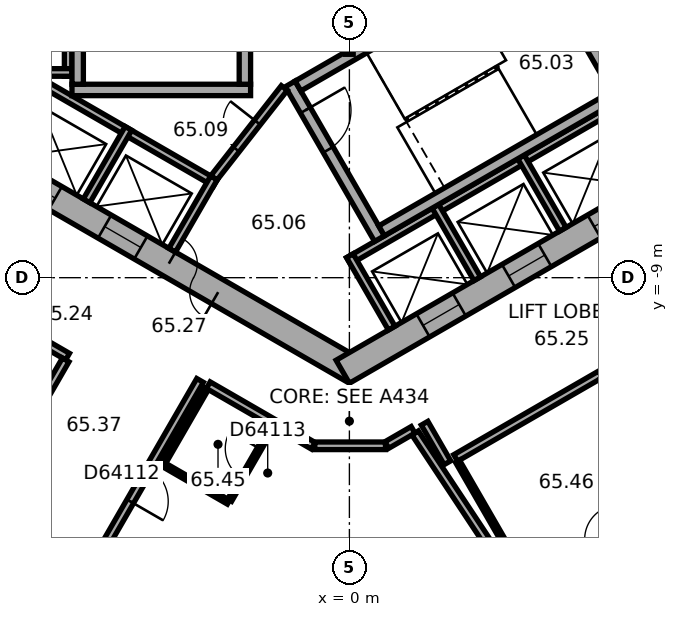
"""IFC4 building model, lengths in metres.
Left out: names, types, materials, properties, quantities, classifications, styles, units other than length and angle.
Written with IfcOpenShell. Run it as: python <this file> out.ifc"""

import sys

from ifc_helpers import new_model, si_unit, direction, frame, frame_2d, origin, place, context, subcontext, project, spatial, rectangle, extrude, element, fill, save


model = new_model("IFC4")
c1 = context("Model", 3, precision=1e-05, world=origin(), true_north=direction((0.0, 1.0)))
c2 = subcontext(c1, "Body", "Model", "MODEL_VIEW")
j1 = project(units=[si_unit("LENGTHUNIT", "METRE"), si_unit("PLANEANGLEUNIT", "RADIAN")], contexts=[c1])
p1 = place(None, origin())
s1 = spatial("IfcSite", under=j1, at=p1, CompositionType="ELEMENT")
p2 = place(p1, origin())
s2 = spatial("IfcBuilding", under=s1, at=p2, CompositionType="ELEMENT")
p3 = place(p2, frame((0.0, 0.0, 263.5)))
s3 = spatial("IfcBuildingStorey", under=s2, at=p3, CompositionType="ELEMENT", Elevation=263.5)
p4 = place(p3, frame((-10.025, -5.586, 0.0), z_axis=(0.0, 0.0, 1.0), x_axis=(0.866026453023, -0.499998182661, 0.0)))
e1 = element("IfcWall", 1, at=p4, inside=s3, PredefinedType="SHEAR", context=c2, shape_type="SweptSolid", body=[
    extrude(rectangle(XDim=11.778, YDim=0.7, at=frame_2d((5.889, 0.0))), origin(), (0.0, 0.0, 1.0), 3.7),
])
p5 = place(p4, frame((6.089, 0.0, 0.0)))
e2 = element("IfcOpeningElement", 2, at=p5, cuts=e1, PredefinedType="OPENING", context=c2, shape_type="SweptSolid", body=[
    extrude(rectangle(XDim=1.5, YDim=2.1, at=frame_2d((0.75, 1.05))), frame((0.0, 0.36, 0.0), z_axis=(0.0, -1.0, 0.0), x_axis=(1.0, 0.0, 0.0)), (0.0, 0.0, 1.0), 0.72),
])
p6 = place(p4, frame((1.539, 0.0, 0.0)))
e3 = element("IfcOpeningElement", 3, at=p6, cuts=e1, PredefinedType="OPENING", context=c2, shape_type="SweptSolid", body=[
    extrude(rectangle(XDim=1.1, YDim=2.1, at=frame_2d((0.55, 1.05))), frame((0.0, 0.36, 0.0), z_axis=(0.0, -1.0, 0.0), x_axis=(1.0, 0.0, 0.0)), (0.0, 0.0, 1.0), 0.72),
])
p7 = place(p4, frame((4.139, 0.0, 0.0)))
e4 = element("IfcOpeningElement", 4, at=p7, cuts=e1, PredefinedType="OPENING", context=c2, shape_type="SweptSolid", body=[
    extrude(rectangle(XDim=1.1, YDim=2.1, at=frame_2d((0.55, 1.05))), frame((0.0, 0.36, 0.0), z_axis=(0.0, -1.0, 0.0), x_axis=(1.0, 0.0, 0.0)), (0.0, 0.0, 1.0), 0.72),
])
p8 = place(p3, frame((-0.175, -11.475, 0.0), z_axis=(0.0, 0.0, 1.0), x_axis=(0.866026453023, 0.499998182661, 0.0)))
e5 = element("IfcWall", 5, at=p8, inside=s3, PredefinedType="SHEAR", context=c2, shape_type="SweptSolid", body=[
    extrude(rectangle(XDim=11.778, YDim=0.7, at=frame_2d((5.889, 0.0))), origin(), (0.0, 0.0, 1.0), 3.7),
])
p9 = place(p8, frame((2.439, 0.0, 0.0)))
e6 = element("IfcOpeningElement", 6, at=p9, cuts=e5, PredefinedType="OPENING", context=c2, shape_type="SweptSolid", body=[
    extrude(rectangle(XDim=1.1, YDim=2.1, at=frame_2d((0.55, 1.05))), frame((0.0, 0.36, 0.0), z_axis=(0.0, -1.0, 0.0), x_axis=(1.0, 0.0, 0.0)), (0.0, 0.0, 1.0), 0.72),
])
p10 = place(p8, frame((5.039, 0.0, 0.0)))
e7 = element("IfcOpeningElement", 7, at=p10, cuts=e5, PredefinedType="OPENING", context=c2, shape_type="SweptSolid", body=[
    extrude(rectangle(XDim=1.1, YDim=2.1, at=frame_2d((0.55, 1.05))), frame((0.0, 0.36, 0.0), z_axis=(0.0, -1.0, 0.0), x_axis=(1.0, 0.0, 0.0)), (0.0, 0.0, 1.0), 0.72),
])
p11 = place(p8, frame((7.639, 0.0, 0.0)))
e8 = element("IfcOpeningElement", 8, at=p11, cuts=e5, PredefinedType="OPENING", context=c2, shape_type="SweptSolid", body=[
    extrude(rectangle(XDim=1.1, YDim=2.1, at=frame_2d((0.55, 1.05))), frame((0.0, 0.36, 0.0), z_axis=(0.0, -1.0, 0.0), x_axis=(1.0, 0.0, 0.0)), (0.0, 0.0, 1.0), 0.72),
])
p12 = place(p3, frame((-16.626, -12.629, 0.0), z_axis=(0.0, 0.0, 1.0), x_axis=(0.866026460444, -0.499998169808, 0.0)))
e9 = element("IfcWall", 9, at=p12, inside=s3, PredefinedType="STANDARD", context=c2, shape_type="SweptSolid", body=[
    extrude(rectangle(XDim=17.731, YDim=0.2, at=frame_2d((8.866, 0.0))), origin(), (0.0, 0.0, 1.0), 3.7),
])
p13 = place(p12, frame((1.203, 0.0, 0.9)))
e10 = element("IfcOpeningElement", 10, at=p13, cuts=e9, PredefinedType="OPENING", context=c2, shape_type="SweptSolid", body=[
    extrude(rectangle(XDim=2.0, YDim=2.0, at=frame_2d((1.0, 1.0))), frame((0.0, 0.11, 0.0), z_axis=(0.0, -1.0, 0.0), x_axis=(1.0, 0.0, 0.0)), (0.0, 0.0, 1.0), 0.22),
])
p14 = place(p12, frame((4.535, 0.0, 0.9)))
e11 = element("IfcOpeningElement", 11, at=p14, cuts=e9, PredefinedType="OPENING", context=c2, shape_type="SweptSolid", body=[
    extrude(rectangle(XDim=2.0, YDim=2.0, at=frame_2d((1.0, 1.0))), frame((0.0, 0.11, 0.0), z_axis=(0.0, -1.0, 0.0), x_axis=(1.0, 0.0, 0.0)), (0.0, 0.0, 1.0), 0.22),
])
p15 = place(p12, frame((7.867, 0.0, 0.9)))
e12 = element("IfcOpeningElement", 12, at=p15, cuts=e9, PredefinedType="OPENING", context=c2, shape_type="SweptSolid", body=[
    extrude(rectangle(XDim=2.0, YDim=2.0, at=frame_2d((1.0, 1.0))), frame((0.0, 0.11, 0.0), z_axis=(0.0, -1.0, 0.0), x_axis=(1.0, 0.0, 0.0)), (0.0, 0.0, 1.0), 0.22),
])
p16 = place(p12, frame((11.198, 0.0, 0.9)))
e13 = element("IfcOpeningElement", 13, at=p16, cuts=e9, PredefinedType="OPENING", context=c2, shape_type="SweptSolid", body=[
    extrude(rectangle(XDim=2.0, YDim=2.0, at=frame_2d((1.0, 1.0))), frame((0.0, 0.11, 0.0), z_axis=(0.0, -1.0, 0.0), x_axis=(1.0, 0.0, 0.0)), (0.0, 0.0, 1.0), 0.22),
])
p17 = place(p12, frame((14.53, 0.0, 0.9)))
e14 = element("IfcOpeningElement", 14, at=p17, cuts=e9, PredefinedType="OPENING", context=c2, shape_type="SweptSolid", body=[
    extrude(rectangle(XDim=2.0, YDim=2.0, at=frame_2d((1.0, 1.0))), frame((0.0, 0.11, 0.0), z_axis=(0.0, -1.0, 0.0), x_axis=(1.0, 0.0, 0.0)), (0.0, 0.0, 1.0), 0.22),
])
p18 = place(p3, frame((2.58, -21.377, 0.0), z_axis=(0.0, 0.0, 1.0), x_axis=(0.833888592176, 0.551932800112, 0.0)))
e15 = element("IfcWall", 15, at=p18, inside=s3, PredefinedType="STANDARD", context=c2, shape_type="SweptSolid", body=[
    extrude(rectangle(XDim=17.731, YDim=0.2, at=frame_2d((8.866, 0.0))), origin(), (0.0, 0.0, 1.0), 3.7),
])
p19 = place(p18, frame((1.202, 0.0, 0.9)))
e16 = element("IfcOpeningElement", 16, at=p19, cuts=e15, PredefinedType="OPENING", context=c2, shape_type="SweptSolid", body=[
    extrude(rectangle(XDim=2.0, YDim=2.0, at=frame_2d((1.0, 1.0))), frame((0.0, 0.11, 0.0), z_axis=(0.0, -1.0, 0.0), x_axis=(1.0, 0.0, 0.0)), (0.0, 0.0, 1.0), 0.22),
])
p20 = place(p18, frame((4.533, 0.0, 0.9)))
e17 = element("IfcOpeningElement", 17, at=p20, cuts=e15, PredefinedType="OPENING", context=c2, shape_type="SweptSolid", body=[
    extrude(rectangle(XDim=2.0, YDim=2.0, at=frame_2d((1.0, 1.0))), frame((0.0, 0.11, 0.0), z_axis=(0.0, -1.0, 0.0), x_axis=(1.0, 0.0, 0.0)), (0.0, 0.0, 1.0), 0.22),
])
p21 = place(p18, frame((7.865, 0.0, 0.9)))
e18 = element("IfcOpeningElement", 18, at=p21, cuts=e15, PredefinedType="OPENING", context=c2, shape_type="SweptSolid", body=[
    extrude(rectangle(XDim=2.0, YDim=2.0, at=frame_2d((1.0, 1.0))), frame((0.0, 0.11, 0.0), z_axis=(0.0, -1.0, 0.0), x_axis=(1.0, 0.0, 0.0)), (0.0, 0.0, 1.0), 0.22),
])
p22 = place(p18, frame((11.197, 0.0, 0.9)))
e19 = element("IfcOpeningElement", 19, at=p22, cuts=e15, PredefinedType="OPENING", context=c2, shape_type="SweptSolid", body=[
    extrude(rectangle(XDim=2.0, YDim=2.0, at=frame_2d((1.0, 1.0))), frame((0.0, 0.11, 0.0), z_axis=(0.0, -1.0, 0.0), x_axis=(1.0, 0.0, 0.0)), (0.0, 0.0, 1.0), 0.22),
])
p23 = place(p18, frame((14.528, 0.0, 0.9)))
e20 = element("IfcOpeningElement", 20, at=p23, cuts=e15, PredefinedType="OPENING", context=c2, shape_type="SweptSolid", body=[
    extrude(rectangle(XDim=2.0, YDim=2.0, at=frame_2d((1.0, 1.0))), frame((0.0, 0.11, 0.0), z_axis=(0.0, -1.0, 0.0), x_axis=(1.0, 0.0, 0.0)), (0.0, 0.0, 1.0), 0.22),
])
p24 = place(p3, frame((-7.4, 4.3, 0.0), z_axis=(0.0, 0.0, 1.0), x_axis=(0.0, -1.0, 0.0)))
e21 = element("IfcWall", 21, at=p24, inside=s3, PredefinedType="PARTITIONING", context=c2, shape_type="SweptSolid", body=[
    extrude(rectangle(XDim=8.0, YDim=0.2, at=frame_2d((4.0, 0.0))), origin(), (0.0, 0.0, 1.0), 3.42),
])
p25 = place(p3, frame((-7.3, -3.6, 0.0), z_axis=(0.0, 0.0, 1.0), x_axis=(-1.0, 0.0, 0.0)))
e22 = element("IfcWall", 22, at=p25, inside=s3, PredefinedType="PARTITIONING", context=c2, shape_type="SweptSolid", body=[
    extrude(rectangle(XDim=2.2, YDim=0.2, at=frame_2d((1.1, 0.0))), origin(), (0.0, 0.0, 1.0), 3.42),
])
p26 = place(p3, frame((-8.203, -3.809, 0.0), z_axis=(0.0, 0.0, 1.0), x_axis=(0.866028230842, -0.499995103361, 0.0)))
e23 = element("IfcWall", 23, at=p26, inside=s3, PredefinedType="PARTITIONING", context=c2, shape_type="SweptSolid", body=[
    extrude(rectangle(XDim=5.4, YDim=0.2, at=frame_2d((2.7, 0.0))), origin(), (0.0, 0.0, 1.0), 3.42),
])
p27 = place(p3, frame((-5.815, -5.072, 0.0), z_axis=(0.0, 0.0, 1.0), x_axis=(-0.499946605688, -0.86605622881, 0.0)))
e24 = element("IfcWall", 24, at=p27, inside=s3, PredefinedType="PARTITIONING", context=c2, shape_type="SweptSolid", body=[
    extrude(rectangle(XDim=2.2, YDim=0.2, at=frame_2d((1.1, 0.0))), origin(), (0.0, 0.0, 1.0), 3.42),
])
p28 = place(p3, frame((-3.563, -6.372, 0.0), z_axis=(0.0, 0.0, 1.0), x_axis=(-0.499994660107, -0.866028486751, 0.0)))
e25 = element("IfcWall", 25, at=p28, inside=s3, PredefinedType="PARTITIONING", context=c2, shape_type="SweptSolid", body=[
    extrude(rectangle(XDim=2.2, YDim=0.2, at=frame_2d((1.1, 0.0))), origin(), (0.0, 0.0, 1.0), 3.42),
])
p29 = place(p3, frame((-0.024, -8.559, 0.0), z_axis=(0.0, 0.0, 1.0), x_axis=(0.866026010844, 0.49999894854, 0.0)))
e26 = element("IfcWall", 26, at=p29, inside=s3, PredefinedType="PARTITIONING", context=c2, shape_type="SweptSolid", body=[
    extrude(rectangle(XDim=8.0, YDim=0.2, at=frame_2d((4.0, 0.0))), origin(), (0.0, 0.0, 1.0), 3.42),
])
for number, where, z_axis, x_axis in (
    (27, (0.013, -8.422, 0.0), (0.0, 0.0, 1.0), (0.5, -0.866, 0.0)),
    (28, (2.264, -7.122, 0.0), (0.0, 0.0, 1.0), (0.5, -0.866, 0.0)),
    (29, (4.516, -5.822, 0.0), (0.0, 0.0, 1.0), (0.5, -0.866, 0.0)),
):
    element("IfcWall", number, at=place(p3, frame(where, z_axis=z_axis, x_axis=x_axis)), inside=s3, PredefinedType="PARTITIONING", context=c2, shape_type="SweptSolid", body=[
        extrude(rectangle(XDim=2.2, YDim=0.2, at=frame_2d((1.1, 0.0))), origin(), (0.0, 0.0, 1.0), 3.42),
    ])
p30 = place(p3, frame((-2.6, -4.06, 0.0), z_axis=(0.0, 0.0, 1.0), x_axis=(-1.0, 0.0, 0.0)))
e30 = element("IfcWall", 30, at=p30, inside=s3, PredefinedType="SHEAR", context=c2, shape_type="SweptSolid", body=[
    extrude(rectangle(XDim=4.7, YDim=0.3, at=frame_2d((2.35, 0.0))), origin(), (0.0, 0.0, 1.0), 3.42),
])
for number, where, z_axis, x_axis in (
    (31, (-2.75, 3.15, 0.0), (0.0, 0.0, 1.0), (0.0, -1.0, 0.0)),
    (32, (-7.15, 3.15, 0.0), (0.0, 0.0, 1.0), (0.0, -1.0, 0.0)),
):
    element("IfcWall", number, at=place(p3, frame(where, z_axis=z_axis, x_axis=x_axis)), inside=s3, PredefinedType="SHEAR", context=c2, shape_type="SweptSolid", body=[
        extrude(rectangle(XDim=7.06, YDim=0.3, at=frame_2d((3.53, 0.0))), origin(), (0.0, 0.0, 1.0), 3.42),
    ])
p31 = place(p3, frame((-1.558, -3.902, 0.0), z_axis=(0.0, 0.0, 1.0), x_axis=(0.499977259774, -0.866038532462, 0.0)))
e33 = element("IfcWall", 33, at=p31, inside=s3, PredefinedType="SHEAR", context=c2, shape_type="SweptSolid", body=[
    extrude(rectangle(XDim=4.7, YDim=0.3, at=frame_2d((2.35, 0.0))), origin(), (0.0, 0.0, 1.0), 3.42),
])
p32 = place(p31, frame((0.8, 0.0, 0.0)))
e34 = element("IfcOpeningElement", 34, at=p32, cuts=e33, PredefinedType="OPENING", context=c2, shape_type="SweptSolid", body=[
    extrude(rectangle(XDim=1.2, YDim=2.1, at=frame_2d((0.6, 1.05))), frame((0.0, 0.16, 0.0), z_axis=(0.0, -1.0, 0.0), x_axis=(1.0, 0.0, 0.0)), (0.0, 0.0, 1.0), 0.32),
])
p33 = place(p3, frame((4.816, -0.222, 0.0), z_axis=(0.0, 0.0, 1.0), x_axis=(0.499977259774, -0.866038532462, 0.0)))
e35 = element("IfcWall", 35, at=p33, inside=s3, PredefinedType="SHEAR", context=c2, shape_type="SweptSolid", body=[
    extrude(rectangle(XDim=4.7, YDim=0.3, at=frame_2d((2.35, 0.0))), origin(), (0.0, 0.0, 1.0), 3.42),
])
for number, where, z_axis, x_axis in (
    (36, (-1.353, -3.957, 0.0), (0.0, 0.0, 1.0), (0.866, 0.5, 0.0)),
    (37, (0.847, -7.767, 0.0), (0.0, 0.0, 1.0), (0.866, 0.5, 0.0)),
):
    element("IfcWall", number, at=place(p3, frame(where, z_axis=z_axis, x_axis=x_axis)), inside=s3, PredefinedType="SHEAR", context=c2, shape_type="SweptSolid", body=[
        extrude(rectangle(XDim=7.06, YDim=0.3, at=frame_2d((3.53, 0.0))), origin(), (0.0, 0.0, 1.0), 3.42),
    ])
p34 = place(p3, frame((-1.712, -4.008, 0.0), z_axis=(0.0, 0.0, 1.0), x_axis=(-0.616549420702, -0.787316208287, 0.0)))
e38 = element("IfcWall", 38, at=p34, inside=s3, PredefinedType="PARTITIONING", context=c2, shape_type="SweptSolid", body=[
    extrude(rectangle(XDim=3.002, YDim=0.2, at=frame_2d((1.501, 0.0))), origin(), (0.0, 0.0, 1.0), 3.42),
])
p35 = place(p34, frame((1.15, 0.0, 0.0)))
e39 = element("IfcOpeningElement", 39, at=p35, cuts=e38, PredefinedType="OPENING", context=c2, shape_type="SweptSolid", body=[
    extrude(rectangle(XDim=0.9, YDim=2.1, at=frame_2d((0.45, 1.05))), frame((0.0, 0.11, 0.0), z_axis=(0.0, -1.0, 0.0), x_axis=(1.0, 0.0, 0.0)), (0.0, 0.0, 1.0), 0.22),
])
p36 = place(p3, frame((0.0, -3.122, 0.0), z_axis=(0.0, 0.0, 1.0), x_axis=(0.0, 1.0, 0.0)))
e40 = element("IfcWall", 40, at=p36, inside=s3, PredefinedType="PARTITIONING", context=c2, shape_type="SweptSolid", body=[
    extrude(rectangle(XDim=6.245, YDim=0.2, at=frame_2d((3.122, 0.0))), origin(), (0.0, 0.0, 1.0), 3.42),
])
p37 = place(p3, frame((-11.501, -8.719, 0.0), z_axis=(0.0, 0.0, 1.0), x_axis=(0.866024434742, -0.500001678427, 0.0)))
e41 = element("IfcWall", 41, at=p37, inside=s3, PredefinedType="PARTITIONING", context=c2, shape_type="SweptSolid", body=[
    extrude(rectangle(XDim=4.718, YDim=0.2, at=frame_2d((2.359, 0.0))), origin(), (0.0, 0.0, 1.0), 3.42),
])
p38 = place(p3, frame((-9.99, -15.537, 0.0), z_axis=(0.0, 0.0, 1.0), x_axis=(0.499966611936, 0.866044679534, 0.0)))
e42 = element("IfcWall", 42, at=p38, inside=s3, PredefinedType="PARTITIONING", context=c2, shape_type="SweptSolid", body=[
    extrude(rectangle(XDim=5.049, YDim=0.2, at=frame_2d((2.524, 0.0))), origin(), (0.0, 0.0, 1.0), 2.87),
])
p39 = place(p38, frame((2.024, 0.0, 0.0)))
e43 = element("IfcOpeningElement", 43, at=p39, cuts=e42, PredefinedType="OPENING", context=c2, shape_type="SweptSolid", body=[
    extrude(rectangle(XDim=1.0, YDim=2.1, at=frame_2d((0.5, 1.05))), frame((0.0, 0.11, 0.0), z_axis=(0.0, -1.0, 0.0), x_axis=(1.0, 0.0, 0.0)), (0.0, 0.0, 1.0), 0.22),
])
p40 = place(p3, frame((-7.105, -17.202, 0.0), z_axis=(0.0, 0.0, 1.0), x_axis=(0.499988692146, 0.866031932279, 0.0)))
e44 = element("IfcWall", 44, at=p40, inside=s3, PredefinedType="PARTITIONING", context=c2, shape_type="SweptSolid", body=[
    extrude(rectangle(XDim=6.35, YDim=0.2, at=frame_2d((3.175, 0.0))), origin(), (0.0, 0.0, 1.0), 3.42),
])
p41 = place(p40, frame((2.675, 0.0, 0.0)))
e45 = element("IfcOpeningElement", 45, at=p41, cuts=e44, PredefinedType="OPENING", context=c2, shape_type="SweptSolid", body=[
    extrude(rectangle(XDim=1.0, YDim=2.1, at=frame_2d((0.5, 1.05))), frame((0.0, 0.11, 0.0), z_axis=(0.0, -1.0, 0.0), x_axis=(1.0, 0.0, 0.0)), (0.0, 0.0, 1.0), 0.22),
])
p42 = place(p3, frame((-4.913, -13.906, 0.0), z_axis=(0.0, 0.0, 1.0), x_axis=(0.500031774688, 0.866007057882, 0.0)))
e46 = element("IfcWall", 46, at=p42, inside=s3, PredefinedType="PARTITIONING", context=c2, shape_type="SweptSolid", body=[
    extrude(rectangle(XDim=2.3, YDim=0.12, at=frame_2d((1.15, 0.0))), origin(), (0.0, 0.0, 1.0), 3.42),
])
p43 = place(p3, frame((-3.713, -11.828, 0.0), z_axis=(0.0, 0.0, 1.0), x_axis=(0.866026321388, -0.499998410661, 0.0)))
e47 = element("IfcWall", 47, at=p43, inside=s3, PredefinedType="PARTITIONING", context=c2, shape_type="SweptSolid", body=[
    extrude(rectangle(XDim=3.191, YDim=0.2, at=frame_2d((1.595, 0.0))), origin(), (0.0, 0.0, 1.0), 3.42),
])
p44 = place(p3, frame((-3.181, -14.906, 0.0), z_axis=(0.0, 0.0, 1.0), x_axis=(-0.866043088465, 0.499969367985, 0.0)))
e48 = element("IfcWall", 48, at=p44, inside=s3, PredefinedType="PARTITIONING", context=c2, shape_type="SweptSolid", body=[
    extrude(rectangle(XDim=1.94, YDim=0.12, at=frame_2d((0.97, 0.0))), origin(), (0.0, 0.0, 1.0), 3.42),
])
p45 = place(p3, frame((-2.031, -12.915, 0.0), z_axis=(0.0, 0.0, 1.0), x_axis=(-0.49994888933, -0.866054910533, 0.0)))
e49 = element("IfcWall", 49, at=p45, inside=s3, PredefinedType="PARTITIONING", context=c2, shape_type="SweptSolid", body=[
    extrude(rectangle(XDim=2.24, YDim=0.12, at=frame_2d((1.12, 0.0))), origin(), (0.0, 0.0, 1.0), 3.42),
])
p46 = place(p45, frame((0.67, 0.0, 0.0)))
e50 = element("IfcOpeningElement", 50, at=p46, cuts=e49, PredefinedType="OPENING", context=c2, shape_type="SweptSolid", body=[
    extrude(rectangle(XDim=0.9, YDim=2.1, at=frame_2d((0.45, 1.05))), frame((0.0, 0.07, 0.0), z_axis=(0.0, -1.0, 0.0), x_axis=(1.0, 0.0, 0.0)), (0.0, 0.0, 1.0), 0.14),
])
p47 = place(p3, frame((-0.91, -13.423, 0.0), z_axis=(0.0, 0.0, 1.0), x_axis=(1.0, 0.0, 0.0)))
e51 = element("IfcWall", 51, at=p47, inside=s3, PredefinedType="PARTITIONING", context=c2, shape_type="SweptSolid", body=[
    extrude(rectangle(XDim=1.86, YDim=0.2, at=frame_2d((0.93, 0.0))), origin(), (0.0, 0.0, 1.0), 3.42),
])
p48 = place(p3, frame((0.985, -13.403, 0.0), z_axis=(0.0, 0.0, 1.0), x_axis=(0.866032814021, 0.499987164874, 0.0)))
e52 = element("IfcWall", 52, at=p48, inside=s3, PredefinedType="PARTITIONING", context=c2, shape_type="SweptSolid", body=[
    extrude(rectangle(XDim=0.798, YDim=0.2, at=frame_2d((0.399, 0.0))), origin(), (0.0, 0.0, 1.0), 3.42),
])
p49 = place(p3, frame((1.979, -12.829, 0.0), z_axis=(0.0, 0.0, 1.0), x_axis=(0.500074377092, -0.865982457891, 0.0)))
e53 = element("IfcWall", 53, at=p49, inside=s3, PredefinedType="PARTITIONING", context=c2, shape_type="SweptSolid", body=[
    extrude(rectangle(XDim=1.201, YDim=0.2, at=frame_2d((0.601, 0.0))), origin(), (0.0, 0.0, 1.0), 3.42),
])
p50 = place(p3, frame((2.796, -13.744, 0.0), z_axis=(0.0, 0.0, 1.0), x_axis=(0.866018331238, 0.50001224981, 0.0)))
e54 = element("IfcWall", 54, at=p50, inside=s3, PredefinedType="PARTITIONING", context=c2, shape_type="SweptSolid", body=[
    extrude(rectangle(XDim=4.4, YDim=0.2, at=frame_2d((2.2, 0.0))), origin(), (0.0, 0.0, 1.0), 3.42),
])
p51 = place(p3, frame((4.796, -17.208, 0.0), z_axis=(0.0, 0.0, 1.0), x_axis=(-0.500043961785, 0.866000020948, 0.0)))
e55 = element("IfcWall", 55, at=p51, inside=s3, PredefinedType="PARTITIONING", context=c2, shape_type="SweptSolid", body=[
    extrude(rectangle(XDim=3.9, YDim=0.12, at=frame_2d((1.95, 0.0))), origin(), (0.0, 0.0, 1.0), 3.42),
])
p52 = place(p3, frame((5.364, -18.575, 0.0), z_axis=(0.0, 0.0, 1.0), x_axis=(-0.55195757761, 0.833872191957, 0.0)))
e56 = element("IfcWall", 56, at=p52, inside=s3, PredefinedType="PARTITIONING", context=c2, shape_type="SweptSolid", body=[
    extrude(rectangle(XDim=6.581, YDim=0.2, at=frame_2d((3.291, 0.0))), origin(), (0.0, 0.0, 1.0), 3.42),
])
p53 = place(p3, frame((8.554, -15.039, 0.0), z_axis=(0.0, 0.0, 1.0), x_axis=(-0.865994635417, -0.500053288589, 0.0)))
e57 = element("IfcWall", 57, at=p53, inside=s3, PredefinedType="PARTITIONING", context=c2, shape_type="SweptSolid", body=[
    extrude(rectangle(XDim=4.28, YDim=0.12, at=frame_2d((2.14, 0.0))), origin(), (0.0, 0.0, 1.0), 3.42),
])
p54 = place(p53, frame((1.69, 0.0, 0.0)))
e58 = element("IfcOpeningElement", 58, at=p54, cuts=e57, PredefinedType="OPENING", context=c2, shape_type="SweptSolid", body=[
    extrude(rectangle(XDim=0.9, YDim=2.1, at=frame_2d((0.45, 1.05))), frame((0.0, 0.07, 0.0), z_axis=(0.0, -1.0, 0.0), x_axis=(1.0, 0.0, 0.0)), (0.0, 0.0, 1.0), 0.14),
])
p55 = place(p5, origin())
e59 = element("IfcDoor", 59, at=p55, inside=s3, OperationType="DOUBLE_DOOR_SINGLE_SWING", PredefinedType="DOOR", context=c2, shape_type="SweptSolid", body=[
    extrude(rectangle(XDim=1.5, YDim=2.1, at=frame_2d((0.75, 1.05))), frame((0.0, 0.025, 0.0), z_axis=(0.0, -1.0, 0.0), x_axis=(1.0, 0.0, 0.0)), (0.0, 0.0, 1.0), 0.05),
])
fill(e2, e59)
p56 = place(p32, origin())
e60 = element("IfcDoor", 60, at=p56, inside=s3, OperationType="SINGLE_SWING_RIGHT", PredefinedType="DOOR", context=c2, shape_type="SweptSolid", body=[
    extrude(rectangle(XDim=1.2, YDim=2.1, at=frame_2d((0.6, 1.05))), frame((0.0, 0.025, 0.0), z_axis=(0.0, -1.0, 0.0), x_axis=(1.0, 0.0, 0.0)), (0.0, 0.0, 1.0), 0.05),
])
fill(e34, e60)
p57 = place(p35, origin())
e61 = element("IfcDoor", 61, at=p57, inside=s3, OperationType="SINGLE_SWING_LEFT", PredefinedType="DOOR", context=c2, shape_type="SweptSolid", body=[
    extrude(rectangle(XDim=0.9, YDim=2.1, at=frame_2d((0.45, 1.05))), frame((0.0, 0.025, 0.0), z_axis=(0.0, -1.0, 0.0), x_axis=(1.0, 0.0, 0.0)), (0.0, 0.0, 1.0), 0.05),
])
fill(e39, e61)
p58 = place(p6, origin())
e62 = element("IfcDoor", 62, at=p58, inside=s3, OperationType="DOUBLE_DOOR_SLIDING", PredefinedType="DOOR", context=c2, shape_type="SweptSolid", body=[
    extrude(rectangle(XDim=1.1, YDim=2.1, at=frame_2d((0.55, 1.05))), frame((0.0, 0.025, 0.0), z_axis=(0.0, -1.0, 0.0), x_axis=(1.0, 0.0, 0.0)), (0.0, 0.0, 1.0), 0.05),
])
fill(e3, e62)
p59 = place(p7, origin())
e63 = element("IfcDoor", 63, at=p59, inside=s3, OperationType="DOUBLE_DOOR_SLIDING", PredefinedType="DOOR", context=c2, shape_type="SweptSolid", body=[
    extrude(rectangle(XDim=1.1, YDim=2.1, at=frame_2d((0.55, 1.05))), frame((0.0, 0.025, 0.0), z_axis=(0.0, -1.0, 0.0), x_axis=(1.0, 0.0, 0.0)), (0.0, 0.0, 1.0), 0.05),
])
fill(e4, e63)
p60 = place(p9, origin())
e64 = element("IfcDoor", 64, at=p60, inside=s3, OperationType="DOUBLE_DOOR_SLIDING", PredefinedType="DOOR", context=c2, shape_type="SweptSolid", body=[
    extrude(rectangle(XDim=1.1, YDim=2.1, at=frame_2d((0.55, 1.05))), frame((0.0, 0.025, 0.0), z_axis=(0.0, -1.0, 0.0), x_axis=(1.0, 0.0, 0.0)), (0.0, 0.0, 1.0), 0.05),
])
fill(e6, e64)
p61 = place(p10, origin())
e65 = element("IfcDoor", 65, at=p61, inside=s3, OperationType="DOUBLE_DOOR_SLIDING", PredefinedType="DOOR", context=c2, shape_type="SweptSolid", body=[
    extrude(rectangle(XDim=1.1, YDim=2.1, at=frame_2d((0.55, 1.05))), frame((0.0, 0.025, 0.0), z_axis=(0.0, -1.0, 0.0), x_axis=(1.0, 0.0, 0.0)), (0.0, 0.0, 1.0), 0.05),
])
fill(e7, e65)
p62 = place(p11, origin())
e66 = element("IfcDoor", 66, at=p62, inside=s3, OperationType="DOUBLE_DOOR_SLIDING", PredefinedType="DOOR", context=c2, shape_type="SweptSolid", body=[
    extrude(rectangle(XDim=1.1, YDim=2.1, at=frame_2d((0.55, 1.05))), frame((0.0, 0.025, 0.0), z_axis=(0.0, -1.0, 0.0), x_axis=(1.0, 0.0, 0.0)), (0.0, 0.0, 1.0), 0.05),
])
fill(e8, e66)
p63 = place(p41, origin())
e67 = element("IfcDoor", 67, at=p63, inside=s3, OperationType="SINGLE_SWING_LEFT", PredefinedType="DOOR", context=c2, shape_type="SweptSolid", body=[
    extrude(rectangle(XDim=1.0, YDim=2.1, at=frame_2d((0.5, 1.05))), frame((0.0, 0.025, 0.0), z_axis=(0.0, -1.0, 0.0), x_axis=(1.0, 0.0, 0.0)), (0.0, 0.0, 1.0), 0.05),
])
fill(e45, e67)
p64 = place(p46, origin())
e68 = element("IfcDoor", 68, at=p64, inside=s3, OperationType="SINGLE_SWING_LEFT", PredefinedType="DOOR", context=c2, shape_type="SweptSolid", body=[
    extrude(rectangle(XDim=0.9, YDim=2.1, at=frame_2d((0.45, 1.05))), frame((0.0, 0.025, 0.0), z_axis=(0.0, -1.0, 0.0), x_axis=(1.0, 0.0, 0.0)), (0.0, 0.0, 1.0), 0.05),
])
fill(e50, e68)
save(model, sys.argv[1])
